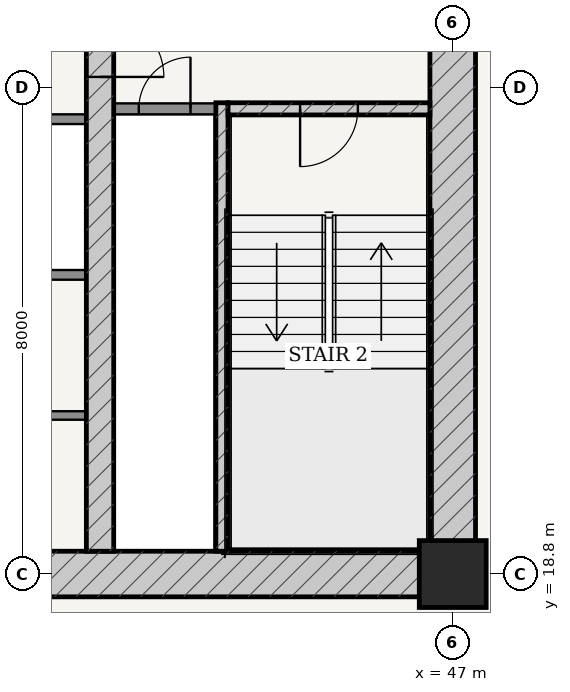
"""IFC4 building model, lengths in metres.
Left out: names, types, materials, properties, quantities, classifications, styles, units other than length and angle.
Written with IfcOpenShell. Run it as: python <this file> out.ifc"""

import sys

from ifc_helpers import new_model, si_unit, direction, frame, frame_2d, origin, origin_2d, place, context, subcontext, project, spatial, rectangle, extrude, source, transform, mapped, element, fill, save


model = new_model("IFC4")
c1 = context("Model", 3, precision=1e-05, world=origin(), true_north=direction((-0.2419218956, 0.970295726276)))
c2 = subcontext(c1, "Body", "Model", "MODEL_VIEW")
j1 = project(units=[si_unit("LENGTHUNIT", "METRE"), si_unit("PLANEANGLEUNIT", "RADIAN")], contexts=[c1])
p1 = place(None, origin())
s1 = spatial("IfcSite", under=j1, at=p1, CompositionType="ELEMENT")
p2 = place(p1, origin())
s2 = spatial("IfcBuilding", under=s1, at=p2, CompositionType="ELEMENT")
p3 = place(p2, frame((0.0, 0.0, 31.2)))
s3 = spatial("IfcBuildingStorey", under=s2, at=p3, CompositionType="ELEMENT", Elevation=31.2)
p4 = place(p3, frame((47.0, 18.8, 0.0), z_axis=(0.0, 0.0, 1.0), x_axis=(1.0, 0.0, 0.0)))
e1 = element("IfcColumn", 1, at=p4, inside=s3, PredefinedType="COLUMN", context=c2, shape_type="SweptSolid", body=[
    extrude(rectangle(XDim=1.1, YDim=1.1, at=origin_2d()), origin(), (0.0, 0.0, 1.0), 3.6),
])
p5 = place(p3, frame((28.625, 18.8, 0.0), z_axis=(0.0, 0.0, 1.0), x_axis=(1.0, 0.0, 0.0)))
e2 = element("IfcWall", 2, at=p5, inside=s3, PredefinedType="SHEAR", context=c2, shape_type="SweptSolid", body=[
    extrude(rectangle(XDim=18.75, YDim=0.75, at=frame_2d((9.375, 0.0))), origin(), (0.0, 0.0, 1.0), 3.32),
])
p6 = place(p5, frame((8.95, 0.0, 0.0)))
e3 = element("IfcOpeningElement", 3, at=p6, cuts=e2, PredefinedType="OPENING", context=c2, shape_type="SweptSolid", body=[
    extrude(rectangle(XDim=0.85, YDim=2.1, at=frame_2d((0.425, 1.05))), frame((0.0, 0.385, 0.0), z_axis=(0.0, -1.0, 0.0), x_axis=(1.0, 0.0, 0.0)), (0.0, 0.0, 1.0), 0.77),
])
p7 = place(p3, frame((47.0, 19.175, 0.0), z_axis=(0.0, 0.0, 1.0), x_axis=(0.0, 1.0, 0.0)))
e4 = element("IfcWall", 4, at=p7, inside=s3, PredefinedType="SHEAR", context=c2, shape_type="SweptSolid", body=[
    extrude(rectangle(XDim=15.25, YDim=0.75, at=frame_2d((7.625, 0.0))), origin(), (0.0, 0.0, 1.0), 3.32),
])
p8 = place(p7, frame((9.875, 0.0, 0.0)))
e5 = element("IfcOpeningElement", 5, at=p8, cuts=e4, PredefinedType="OPENING", context=c2, shape_type="SweptSolid", body=[
    extrude(rectangle(XDim=1.5, YDim=2.2, at=frame_2d((0.75, 1.1))), frame((0.0, 0.385, 0.0), z_axis=(0.0, -1.0, 0.0), x_axis=(1.0, 0.0, 0.0)), (0.0, 0.0, 1.0), 0.77),
])
p9 = place(p3, frame((43.205, 19.175, 0.0), z_axis=(0.0, 0.0, 1.0), x_axis=(0.0, 1.0, 0.0)))
e6 = element("IfcWall", 6, at=p9, inside=s3, PredefinedType="SOLIDWALL", context=c2, shape_type="SweptSolid", body=[
    extrude(rectangle(XDim=7.375, YDim=0.2, at=frame_2d((3.688, 0.0))), origin(), (0.0, 0.0, 1.0), 3.32),
])
p10 = place(p3, frame((43.305, 26.45, 0.0), z_axis=(0.0, 0.0, 1.0), x_axis=(1.0, 0.0, 0.0)))
e7 = element("IfcWall", 7, at=p10, inside=s3, PredefinedType="SOLIDWALL", context=c2, shape_type="SweptSolid", body=[
    extrude(rectangle(XDim=3.32, YDim=0.2, at=frame_2d((1.66, 0.0))), origin(), (0.0, 0.0, 1.0), 3.32),
])
p11 = place(p10, frame((1.185, 0.0, 0.0)))
e8 = element("IfcOpeningElement", 8, at=p11, cuts=e7, PredefinedType="OPENING", context=c2, shape_type="SweptSolid", body=[
    extrude(rectangle(XDim=0.95, YDim=2.15, at=frame_2d((0.475, 1.075))), frame((0.0, 0.11, 0.0), z_axis=(0.0, -1.0, 0.0), x_axis=(1.0, 0.0, 0.0)), (0.0, 0.0, 1.0), 0.22),
])
p12 = place(p3, frame((41.2, 19.175, 0.0), z_axis=(0.0, 0.0, 1.0), x_axis=(0.0, 1.0, 0.0)))
e9 = element("IfcWall", 9, at=p12, inside=s3, PredefinedType="SHEAR", context=c2, shape_type="SweptSolid", body=[
    extrude(rectangle(XDim=15.25, YDim=0.45, at=frame_2d((7.625, 0.0))), origin(), (0.0, 0.0, 1.0), 3.32),
])
p13 = place(p12, frame((7.8, 0.0, 0.0)))
e10 = element("IfcOpeningElement", 10, at=p13, cuts=e9, PredefinedType="OPENING", context=c2, shape_type="SweptSolid", body=[
    extrude(rectangle(XDim=1.05, YDim=2.15, at=frame_2d((0.525, 1.075))), frame((0.0, 0.235, 0.0), z_axis=(0.0, -1.0, 0.0), x_axis=(1.0, 0.0, 0.0)), (0.0, 0.0, 1.0), 0.47),
])
p14 = place(p3, frame((41.425, 26.45, 0.0), z_axis=(0.0, 0.0, 1.0), x_axis=(1.0, 0.0, 0.0)))
e11 = element("IfcWall", 11, at=p14, inside=s3, PredefinedType="PARTITIONING", context=c2, shape_type="SweptSolid", body=[
    extrude(rectangle(XDim=1.675, YDim=0.18, at=frame_2d((0.837, 0.0))), origin(), (0.0, 0.0, 1.0), 3.32),
])
p15 = place(p14, frame((0.413, 0.0, 0.0)))
e12 = element("IfcOpeningElement", 12, at=p15, cuts=e11, PredefinedType="OPENING", context=c2, shape_type="SweptSolid", body=[
    extrude(rectangle(XDim=0.85, YDim=2.1, at=frame_2d((0.425, 1.05))), frame((0.0, 0.1, 0.0), z_axis=(0.0, -1.0, 0.0), x_axis=(1.0, 0.0, 0.0)), (0.0, 0.0, 1.0), 0.2),
])
for number, where, z_axis, x_axis in (
    (13, (35.025, 26.28, 0.0), (0.0, 0.0, 1.0), (1.0, 0.0, 0.0)),
    (14, (35.025, 23.72, 0.0), (0.0, 0.0, 1.0), (1.0, 0.0, 0.0)),
):
    element("IfcWall", number, at=place(p3, frame(where, z_axis=z_axis, x_axis=x_axis)), inside=s3, PredefinedType="PARTITIONING", context=c2, shape_type="SweptSolid", body=[
        extrude(rectangle(XDim=5.95, YDim=0.16, at=frame_2d((2.975, 0.0))), origin(), (0.0, 0.0, 1.0), 3.32),
    ])
p16 = place(p3, frame((35.025, 21.407, 0.0), z_axis=(0.0, 0.0, 1.0), x_axis=(1.0, 0.0, 0.0)))
e15 = element("IfcWall", 15, at=p16, inside=s3, PredefinedType="PARTITIONING", context=c2, shape_type="SweptSolid", body=[
    extrude(rectangle(XDim=5.95, YDim=0.14, at=frame_2d((2.975, 0.0))), origin(), (0.0, 0.0, 1.0), 3.32),
])
p17 = place(p16, frame((2.55, 0.0, 0.0)))
e16 = element("IfcOpeningElement", 16, at=p17, cuts=e15, PredefinedType="OPENING", context=c2, shape_type="SweptSolid", body=[
    extrude(rectangle(XDim=0.85, YDim=2.1, at=frame_2d((0.425, 1.05))), frame((0.0, 0.08, 0.0), z_axis=(0.0, -1.0, 0.0), x_axis=(1.0, 0.0, 0.0)), (0.0, 0.0, 1.0), 0.16),
])
m1 = source(origin(), c2, "Body", "SweptSolid", [
    extrude(rectangle(XDim=1.05, YDim=2.15, at=frame_2d((0.525, 1.075))), frame((0.0, 0.025, 0.0), z_axis=(0.0, -1.0, 0.0), x_axis=(1.0, 0.0, 0.0)), (0.0, 0.0, 1.0), 0.05),
])
p18 = place(p13, frame((1.05, 0.0, 0.0), z_axis=(0.0, 0.0, 1.0), x_axis=(-1.0, 0.0, 0.0)))
e17 = element("IfcDoor", 17, at=p18, inside=s3, OperationType="SINGLE_SWING_RIGHT", PredefinedType="DOOR", context=c2, shape_type="MappedRepresentation", body=[
    mapped(m1, transform((0.0, 0.0, 0.0), scale=1.0)),
])
fill(e10, e17)
m2 = source(origin(), c2, "Body", "SweptSolid", [
    extrude(rectangle(XDim=0.95, YDim=2.15, at=frame_2d((0.475, 1.075))), frame((0.0, 0.025, 0.0), z_axis=(0.0, -1.0, 0.0), x_axis=(1.0, 0.0, 0.0)), (0.0, 0.0, 1.0), 0.05),
])
p19 = place(p11, frame((0.95, 0.0, 0.0), z_axis=(0.0, 0.0, 1.0), x_axis=(-1.0, 0.0, 0.0)))
e18 = element("IfcDoor", 18, at=p19, inside=s3, OperationType="SINGLE_SWING_RIGHT", PredefinedType="DOOR", context=c2, shape_type="MappedRepresentation", body=[
    mapped(m2, transform((0.0, 0.0, 0.0), scale=1.0)),
])
fill(e8, e18)
m3 = source(origin(), c2, "Body", "SweptSolid", [
    extrude(rectangle(XDim=0.85, YDim=2.1, at=frame_2d((0.425, 1.05))), frame((0.0, 0.025, 0.0), z_axis=(0.0, -1.0, 0.0), x_axis=(1.0, 0.0, 0.0)), (0.0, 0.0, 1.0), 0.05),
])
p20 = place(p15, origin())
e19 = element("IfcDoor", 19, at=p20, inside=s3, OperationType="SINGLE_SWING_RIGHT", PredefinedType="DOOR", context=c2, shape_type="MappedRepresentation", body=[
    mapped(m3, transform((0.0, 0.0, 0.0), scale=1.0)),
])
fill(e12, e19)
save(model, sys.argv[1])
